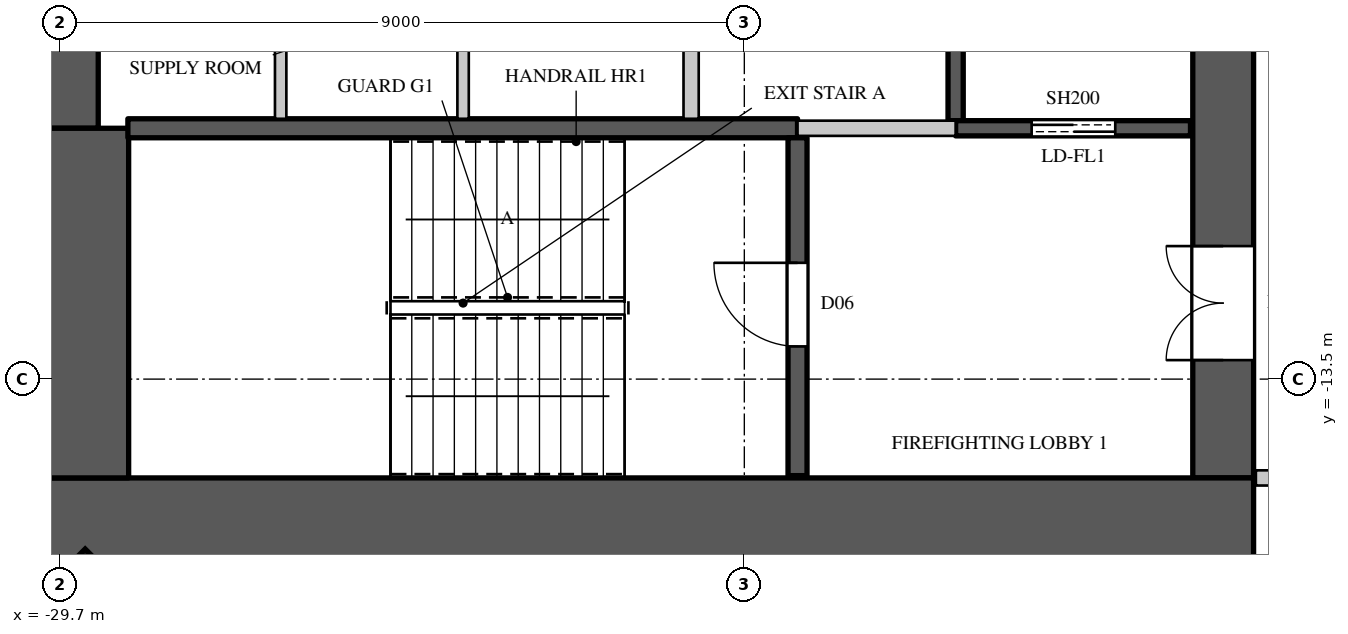
"""IFC4 building model, lengths in metres.
Left out: names, types, materials, properties, quantities, classifications, styles, units other than length and angle.
Written with IfcOpenShell. Run it as: python <this file> out.ifc"""

import sys

from ifc_helpers import new_model, si_unit, direction, frame, frame_2d, origin, origin_2d, place, context, subcontext, project, spatial, rectangle, extrude, element, fill, save


model = new_model("IFC4")
c1 = context("Model", 3, precision=1e-05, world=origin(), true_north=direction((0.0, 1.0)))
c2 = subcontext(c1, "Body", "Model", "MODEL_VIEW")
j1 = project(units=[si_unit("LENGTHUNIT", "METRE"), si_unit("PLANEANGLEUNIT", "RADIAN")], contexts=[c1])
p1 = place(None, origin())
s1 = spatial("IfcSite", under=j1, at=p1, CompositionType="ELEMENT")
p2 = place(p1, origin())
s2 = spatial("IfcBuilding", under=s1, at=p2, CompositionType="ELEMENT")
p3 = place(p2, frame((0.0, 0.0, 160.5)))
s3 = spatial("IfcBuildingStorey", under=s2, at=p3, CompositionType="ELEMENT", Elevation=160.5)
p4 = place(p3, frame((-29.443, -16.443, 0.0), z_axis=(0.0, 0.0, 1.0), x_axis=(0.707106781187, -0.707106781187, 0.0)))
e1 = element("IfcColumn", 1, at=p4, inside=s3, PredefinedType="COLUMN", context=c2, shape_type="SweptSolid", body=[
    extrude(rectangle(XDim=0.9, YDim=1.1, at=origin_2d()), origin(), (0.0, 0.0, 1.0), 4.1),
])
p5 = place(p3, frame((-30.0, -15.4, 0.0), z_axis=(0.0, 0.0, 1.0), x_axis=(1.0, 0.0, 0.0)))
e2 = element("IfcWall", 2, at=p5, inside=s3, PredefinedType="SHEAR", context=c2, shape_type="SweptSolid", body=[
    extrude(rectangle(XDim=16.0, YDim=1.2, at=frame_2d((8.0, 0.0))), origin(), (0.0, 0.0, 1.0), 4.1),
])
p6 = place(p3, frame((-14.4, -14.8, 0.0), z_axis=(0.0, 0.0, 1.0), x_axis=(0.0, 1.0, 0.0)))
e3 = element("IfcWall", 3, at=p6, inside=s3, PredefinedType="SHEAR", context=c2, shape_type="SweptSolid", body=[
    extrude(rectangle(XDim=29.6, YDim=0.8, at=frame_2d((14.8, 0.0))), origin(), (0.0, 0.0, 1.0), 4.1),
])
p7 = place(p6, frame((1.55, 0.0, 0.0)))
e4 = element("IfcOpeningElement", 4, at=p7, cuts=e3, PredefinedType="OPENING", context=c2, shape_type="SweptSolid", body=[
    extrude(rectangle(XDim=1.5, YDim=2.4, at=frame_2d((0.75, 1.2))), frame((0.0, 0.41, 0.0), z_axis=(0.0, -1.0, 0.0), x_axis=(1.0, 0.0, 0.0)), (0.0, 0.0, 1.0), 0.82),
])
p8 = place(p6, frame((26.55, 0.0, 0.0)))
e5 = element("IfcOpeningElement", 5, at=p8, cuts=e3, PredefinedType="OPENING", context=c2, shape_type="SweptSolid", body=[
    extrude(rectangle(XDim=1.5, YDim=2.4, at=frame_2d((0.75, 1.2))), frame((0.0, 0.41, 0.0), z_axis=(0.0, -1.0, 0.0), x_axis=(1.0, 0.0, 0.0)), (0.0, 0.0, 1.0), 0.82),
])
p9 = place(p6, frame((8.45, 0.0, 0.0)))
e6 = element("IfcOpeningElement", 6, at=p9, cuts=e3, PredefinedType="OPENING", context=c2, shape_type="SweptSolid", body=[
    extrude(rectangle(XDim=1.5, YDim=2.4, at=frame_2d((0.75, 1.2))), frame((0.0, 0.41, 0.0), z_axis=(0.0, -1.0, 0.0), x_axis=(1.0, 0.0, 0.0)), (0.0, 0.0, 1.0), 0.82),
])
p10 = place(p6, frame((19.65, 0.0, 0.0)))
e7 = element("IfcOpeningElement", 7, at=p10, cuts=e3, PredefinedType="OPENING", context=c2, shape_type="SweptSolid", body=[
    extrude(rectangle(XDim=1.5, YDim=2.4, at=frame_2d((0.75, 1.2))), frame((0.0, 0.41, 0.0), z_axis=(0.0, -1.0, 0.0), x_axis=(1.0, 0.0, 0.0)), (0.0, 0.0, 1.0), 0.82),
])
p11 = place(p6, frame((14.5, 0.0, 0.0)))
e8 = element("IfcOpeningElement", 8, at=p11, cuts=e3, PredefinedType="OPENING", context=c2, shape_type="SweptSolid", body=[
    extrude(rectangle(XDim=0.6, YDim=2.0, at=frame_2d((0.3, 1.0))), frame((0.0, 0.41, 0.0), z_axis=(0.0, -1.0, 0.0), x_axis=(1.0, 0.0, 0.0)), (0.0, 0.0, 1.0), 0.82),
])
p12 = place(p3, frame((-29.6, -10.2, 0.0), z_axis=(0.0, 0.0, 1.0), x_axis=(0.0, 1.0, 0.0)))
e9 = element("IfcWall", 9, at=p12, inside=s3, PredefinedType="SHEAR", context=c2, shape_type="SweptSolid", body=[
    extrude(rectangle(XDim=20.4, YDim=0.8, at=frame_2d((10.2, 0.0))), origin(), (0.0, 0.0, 1.0), 4.1),
])
p13 = place(p3, frame((-29.4, -14.8, 0.0), z_axis=(0.0, 0.0, 1.0), x_axis=(0.0, 1.0, 0.0)))
e10 = element("IfcWall", 10, at=p13, inside=s3, PredefinedType="SHEAR", context=c2, shape_type="SweptSolid", body=[
    extrude(rectangle(XDim=4.6, YDim=1.2, at=frame_2d((2.3, 0.0))), origin(), (0.0, 0.0, 1.0), 4.1),
])
p14 = place(p3, frame((-13.97, -14.8, 0.0), z_axis=(0.0, 0.0, 1.0), x_axis=(1.0, 0.0, 0.0)))
e11 = element("IfcWall", 11, at=p14, inside=s3, PredefinedType="PARTITIONING", context=c2, shape_type="SweptSolid", body=[
    extrude(rectangle(XDim=2.87, YDim=0.2, at=frame_2d((1.435, 0.0))), origin(), (0.0, 0.0, 1.0), 3.8),
])
for number, where, z_axis, x_axis in (
    (12, (-26.8, -10.075, 0.0), (0.0, 0.0, 1.0), (0.0, 1.0, 0.0)),
    (13, (-24.4, -10.075, 0.0), (0.0, 0.0, 1.0), (0.0, 1.0, 0.0)),
):
    element("IfcWall", number, at=place(p3, frame(where, z_axis=z_axis, x_axis=x_axis)), inside=s3, PredefinedType="PARTITIONING", context=c2, shape_type="SweptSolid", body=[
        extrude(rectangle(XDim=2.575, YDim=0.15, at=frame_2d((1.288, 0.0))), origin(), (0.0, 0.0, 1.0), 3.8),
    ])
p15 = place(p3, frame((-21.4, -10.075, 0.0), z_axis=(0.0, 0.0, 1.0), x_axis=(0.0, 1.0, 0.0)))
e14 = element("IfcWall", 14, at=p15, inside=s3, PredefinedType="PARTITIONING", context=c2, shape_type="SweptSolid", body=[
    extrude(rectangle(XDim=2.575, YDim=0.2, at=frame_2d((1.288, 0.0))), origin(), (0.0, 0.0, 1.0), 3.8),
])
p16 = place(p3, frame((-20.0, -10.2, 0.0), z_axis=(0.0, 0.0, 1.0), x_axis=(1.0, 0.0, 0.0)))
e15 = element("IfcWall", 15, at=p16, inside=s3, PredefinedType="PARTITIONING", context=c2, shape_type="SweptSolid", body=[
    extrude(rectangle(XDim=2.08, YDim=0.2, at=frame_2d((1.04, 0.0))), origin(), (0.0, 0.0, 1.0), 3.8),
])
p17 = place(p3, frame((-17.92, -10.1, 0.0), z_axis=(0.0, 0.0, 1.0), x_axis=(0.0, 1.0, 0.0)))
e16 = element("IfcWall", 16, at=p17, inside=s3, PredefinedType="SHEAR", context=c2, shape_type="SweptSolid", body=[
    extrude(rectangle(XDim=2.6, YDim=0.2, at=frame_2d((1.3, 0.0))), origin(), (0.0, 0.0, 1.0), 3.8),
])
p18 = place(p3, frame((-17.92, -10.2, 0.0), z_axis=(0.0, 0.0, 1.0), x_axis=(1.0, 0.0, 0.0)))
e17 = element("IfcWall", 17, at=p18, inside=s3, PredefinedType="SHEAR", context=c2, shape_type="SweptSolid", body=[
    extrude(rectangle(XDim=3.09, YDim=0.2, at=frame_2d((1.545, 0.0))), origin(), (0.0, 0.0, 1.0), 3.8),
])
p19 = place(p18, frame((1.0, 0.0, 0.0)))
e18 = element("IfcOpeningElement", 18, at=p19, cuts=e17, PredefinedType="OPENING", context=c2, shape_type="SweptSolid", body=[
    extrude(rectangle(XDim=1.1, YDim=2.2, at=frame_2d((0.55, 1.1))), frame((0.0, 0.11, 0.0), z_axis=(0.0, -1.0, 0.0), x_axis=(1.0, 0.0, 0.0)), (0.0, 0.0, 1.0), 0.22),
])
p20 = place(p3, frame((-28.81, -10.2, 0.0), z_axis=(0.0, 0.0, 1.0), x_axis=(1.0, 0.0, 0.0)))
e19 = element("IfcWall", 19, at=p20, inside=s3, PredefinedType="SHEAR", context=c2, shape_type="SweptSolid", body=[
    extrude(rectangle(XDim=8.81, YDim=0.25, at=frame_2d((4.405, 0.0))), origin(), (0.0, 0.0, 1.0), 3.8),
])
p21 = place(p3, frame((-20.0, -14.77, 0.0), z_axis=(0.0, 0.0, 1.0), x_axis=(0.0, 1.0, 0.0)))
e20 = element("IfcWall", 20, at=p21, inside=s3, PredefinedType="SHEAR", context=c2, shape_type="SweptSolid", body=[
    extrude(rectangle(XDim=4.445, YDim=0.25, at=frame_2d((2.223, 0.0))), origin(), (0.0, 0.0, 1.0), 3.8),
])
p22 = place(p21, frame((1.7, 0.0, 0.0)))
e21 = element("IfcOpeningElement", 21, at=p22, cuts=e20, PredefinedType="OPENING", context=c2, shape_type="SweptSolid", body=[
    extrude(rectangle(XDim=1.1, YDim=2.2, at=frame_2d((0.55, 1.1))), frame((0.0, 0.135, 0.0), z_axis=(0.0, -1.0, 0.0), x_axis=(1.0, 0.0, 0.0)), (0.0, 0.0, 1.0), 0.27),
])
p23 = place(p22, origin())
e22 = element("IfcDoor", 22, at=p23, inside=s3, OperationType="SINGLE_SWING_RIGHT", PredefinedType="DOOR", context=c2, shape_type="SweptSolid", body=[
    extrude(rectangle(XDim=1.1, YDim=2.2, at=frame_2d((0.55, 1.1))), frame((0.0, 0.025, 0.0), z_axis=(0.0, -1.0, 0.0), x_axis=(1.0, 0.0, 0.0)), (0.0, 0.0, 1.0), 0.05),
])
fill(e21, e22)
p24 = place(p19, origin())
e23 = element("IfcDoor", 23, at=p24, inside=s3, OperationType="DOUBLE_DOOR_SLIDING", PredefinedType="DOOR", context=c2, shape_type="SweptSolid", body=[
    extrude(rectangle(XDim=1.1, YDim=2.2, at=frame_2d((0.55, 1.1))), frame((0.0, 0.025, 0.0), z_axis=(0.0, -1.0, 0.0), x_axis=(1.0, 0.0, 0.0)), (0.0, 0.0, 1.0), 0.05),
])
fill(e18, e23)
p25 = place(p7, origin())
e24 = element("IfcDoor", 24, at=p25, inside=s3, OperationType="DOUBLE_DOOR_SINGLE_SWING", PredefinedType="DOOR", context=c2, shape_type="SweptSolid", body=[
    extrude(rectangle(XDim=1.5, YDim=2.4, at=frame_2d((0.75, 1.2))), frame((0.0, 0.395, 0.0), z_axis=(0.0, -1.0, 0.0), x_axis=(1.0, 0.0, 0.0)), (0.0, 0.0, 1.0), 0.05),
])
fill(e4, e24)
save(model, sys.argv[1])
